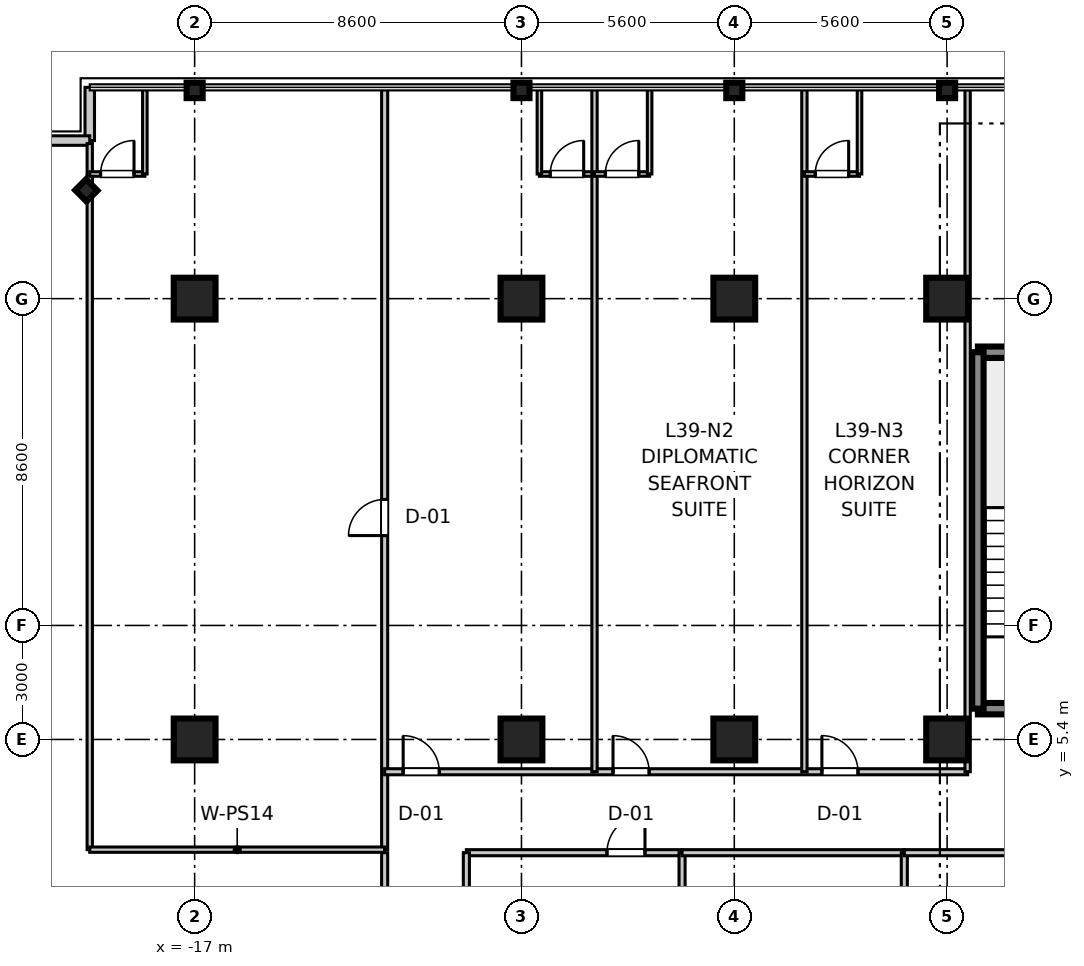
"""IFC4 building model, lengths in metres.
Left out: names, types, materials, properties, quantities, classifications, styles, units other than length and angle.
Written with IfcOpenShell. Run it as: python <this file> out.ifc"""

import sys

from ifc_helpers import new_model, si_unit, direction, frame, frame_2d, origin, origin_2d, place, context, subcontext, project, spatial, rectangle, i_section, extrude, source, transform, mapped, element, fill, save


model = new_model("IFC4")
c1 = context("Model", 3, precision=1e-05, world=origin(), true_north=direction((0.0, 1.0)))
c2 = subcontext(c1, "Body", "Model", "MODEL_VIEW")
j1 = project(units=[si_unit("LENGTHUNIT", "METRE"), si_unit("PLANEANGLEUNIT", "RADIAN")], contexts=[c1])
p1 = place(None, origin())
s1 = spatial("IfcSite", under=j1, at=p1, CompositionType="ELEMENT")
p2 = place(p1, origin())
s2 = spatial("IfcBuilding", under=s1, at=p2, CompositionType="ELEMENT")
p3 = place(p2, frame((0.0, 0.0, 156.3)))
s3 = spatial("IfcBuildingStorey", under=s2, at=p3, CompositionType="ELEMENT", Elevation=156.3)
m1 = source(origin(), c2, "Body", "SweptSolid", [
    extrude(rectangle(XDim=1.1, YDim=1.1, at=origin_2d()), origin(), (0.0, 0.0, 1.0), 3.605),
])
for number, where, z_axis, x_axis in (
    (1, (-17.0, 5.4, 0.0), (0.0, 0.0, 1.0), (1.0, 0.0, 0.0)),
    (2, (-17.0, 17.0, 0.0), (0.0, 0.0, 1.0), (1.0, 0.0, 0.0)),
    (3, (-8.4, 5.4, 0.0), (0.0, 0.0, 1.0), (1.0, 0.0, 0.0)),
    (4, (-8.4, 17.0, 0.0), (0.0, 0.0, 1.0), (1.0, 0.0, 0.0)),
    (5, (-2.8, 5.4, 0.0), (0.0, 0.0, 1.0), (1.0, 0.0, 0.0)),
    (6, (-2.8, 17.0, 0.0), (0.0, 0.0, 1.0), (1.0, 0.0, 0.0)),
    (7, (2.8, 5.4, 0.0), (0.0, 0.0, 1.0), (1.0, 0.0, 0.0)),
    (8, (2.8, 17.0, 0.0), (0.0, 0.0, 1.0), (1.0, 0.0, 0.0)),
):
    element("IfcColumn", number, at=place(p3, frame(where, z_axis=z_axis, x_axis=x_axis)), inside=s3, PredefinedType="COLUMN", context=c2, shape_type="MappedRepresentation", body=[
        mapped(m1, transform((0.0, 0.0, 0.0), scale=1.0)),
    ])
m2 = source(origin(), c2, "Body", "SweptSolid", [
    extrude(i_section(OverallWidth=0.406, OverallDepth=0.422, WebThickness=0.019, FlangeThickness=0.03, at=origin_2d()), origin(), (0.0, 0.0, 1.0), 3.605),
])
for number, where, z_axis, x_axis in (
    (9, (-17.0, 22.48, 0.0), (0.0, 0.0, 1.0), (0.0, 1.0, 0.0)),
    (10, (-8.4, 22.48, 0.0), (0.0, 0.0, 1.0), (0.0, 1.0, 0.0)),
    (11, (-2.8, 22.48, 0.0), (0.0, 0.0, 1.0), (0.0, 1.0, 0.0)),
    (12, (2.8, 22.48, 0.0), (0.0, 0.0, 1.0), (0.0, 1.0, 0.0)),
    (13, (-19.85, 19.85, 0.0), (0.0, 0.0, 1.0), (0.707, 0.707, 0.0)),
):
    element("IfcColumn", number, at=place(p3, frame(where, z_axis=z_axis, x_axis=x_axis)), inside=s3, PredefinedType="COLUMN", context=c2, shape_type="MappedRepresentation", body=[
        mapped(m2, transform((0.0, 0.0, 0.0), scale=1.0)),
    ])
m3 = source(origin(), c2, "Body", "SweptSolid", [
    extrude(rectangle(XDim=3.98, YDim=0.3, at=frame_2d((1.99, 0.0))), origin(), (0.0, 0.0, 1.0), 3.39),
])
for number, where, z_axis, x_axis in (
    (14, (3.61, 6.21, 0.0), (0.0, 0.0, 1.0), (1.0, 0.0, 0.0)),
    (15, (3.61, 15.59, 0.0), (0.0, 0.0, 1.0), (1.0, 0.0, 0.0)),
):
    element("IfcWall", number, at=place(p3, frame(where, z_axis=z_axis, x_axis=x_axis)), inside=s3, PredefinedType="SHEAR", context=c2, shape_type="MappedRepresentation", body=[
        mapped(m3, transform((0.0, 0.0, 0.0), scale=1.0)),
    ])
m4 = source(origin(), c2, "Body", "SweptSolid", [
    extrude(rectangle(XDim=9.38, YDim=0.3, at=frame_2d((4.69, 0.0))), origin(), (0.0, 0.0, 1.0), 3.39),
])
p4 = place(p3, frame((3.61, 6.21, 0.0), z_axis=(0.0, 0.0, 1.0), x_axis=(0.0, 1.0, 0.0)))
e16 = element("IfcWall", 16, at=p4, inside=s3, PredefinedType="SHEAR", context=c2, shape_type="MappedRepresentation", body=[
    mapped(m4, transform((0.0, 0.0, 0.0), scale=1.0)),
])
m5 = source(origin(), c2, "Body", "SweptSolid", [
    extrude(rectangle(XDim=1.4, YDim=0.25, at=frame_2d((0.7, 0.0))), origin(), (0.0, 0.0, 1.0), 3.39),
])
p5 = place(p3, frame((-19.76, 21.16, 0.0), z_axis=(0.0, 0.0, 1.0), x_axis=(0.0, 1.0, 0.0)))
e17 = element("IfcWall", 17, at=p5, inside=s3, PredefinedType="STANDARD", context=c2, shape_type="MappedRepresentation", body=[
    mapped(m5, transform((0.0, 0.0, 0.0), scale=1.0)),
])
m6 = source(origin(), c2, "Body", "SweptSolid", [
    extrude(rectangle(XDim=1.4, YDim=0.25, at=frame_2d((0.7, 0.0))), origin(), (0.0, 0.0, 1.0), 3.39),
])
p6 = place(p3, frame((-21.16, 21.16, 0.0), z_axis=(0.0, 0.0, 1.0), x_axis=(1.0, 0.0, 0.0)))
e18 = element("IfcWall", 18, at=p6, inside=s3, PredefinedType="STANDARD", context=c2, shape_type="MappedRepresentation", body=[
    mapped(m6, transform((0.0, 0.0, 0.0), scale=1.0)),
])
m7 = source(origin(), c2, "Body", "SweptSolid", [
    extrude(rectangle(XDim=20.0, YDim=0.16, at=frame_2d((10.0, 0.0))), origin(), (0.0, 0.0, 1.0), 2.73),
])
p7 = place(p3, frame((-12.0, 2.5, 0.0), z_axis=(0.0, 0.0, 1.0), x_axis=(0.0, 1.0, 0.0)))
e19 = element("IfcWall", 19, at=p7, inside=s3, PredefinedType="PARTITIONING", context=c2, shape_type="MappedRepresentation", body=[
    mapped(m7, transform((0.0, 0.0, 0.0), scale=1.0)),
])
p8 = place(p7, frame((8.265, 0.0, 0.0)))
e20 = element("IfcOpeningElement", 20, at=p8, cuts=e19, PredefinedType="OPENING", context=c2, shape_type="SweptSolid", body=[
    extrude(rectangle(XDim=0.95, YDim=2.1, at=frame_2d((0.475, 1.05))), frame((0.0, 0.09, 0.0), z_axis=(0.0, -1.0, 0.0), x_axis=(1.0, 0.0, 0.0)), (0.0, 0.0, 1.0), 0.18),
])
m8 = source(origin(), c2, "Body", "SweptSolid", [
    extrude(rectangle(XDim=18.58, YDim=0.14, at=frame_2d((9.29, 0.0))), origin(), (0.0, 0.0, 1.0), 2.73),
])
p9 = place(p3, frame((-19.76, 2.5, 0.0), z_axis=(0.0, 0.0, 1.0), x_axis=(0.0, 1.0, 0.0)))
e21 = element("IfcWall", 21, at=p9, inside=s3, PredefinedType="PARTITIONING", context=c2, shape_type="MappedRepresentation", body=[
    mapped(m8, transform((0.0, 0.0, 0.0), scale=1.0)),
])
m9 = source(origin(), c2, "Body", "SweptSolid", [
    extrude(rectangle(XDim=7.76, YDim=0.14, at=frame_2d((3.88, 0.0))), origin(), (0.0, 0.0, 1.0), 2.73),
])
p10 = place(p3, frame((-19.76, 2.5, 0.0), z_axis=(0.0, 0.0, 1.0), x_axis=(1.0, 0.0, 0.0)))
e22 = element("IfcWall", 22, at=p10, inside=s3, PredefinedType="PARTITIONING", context=c2, shape_type="MappedRepresentation", body=[
    mapped(m9, transform((0.0, 0.0, 0.0), scale=1.0)),
])
m10 = source(origin(), c2, "Body", "SweptSolid", [
    extrude(rectangle(XDim=1.45, YDim=0.12, at=frame_2d((0.725, 0.0))), origin(), (0.0, 0.0, 1.0), 2.73),
])
p11 = place(p3, frame((-19.76, 20.28, 0.0), z_axis=(0.0, 0.0, 1.0), x_axis=(1.0, 0.0, 0.0)))
e23 = element("IfcWall", 23, at=p11, inside=s3, PredefinedType="PARTITIONING", context=c2, shape_type="MappedRepresentation", body=[
    mapped(m10, transform((0.0, 0.0, 0.0), scale=1.0)),
])
p12 = place(p11, frame((0.285, 0.0, 0.0)))
e24 = element("IfcOpeningElement", 24, at=p12, cuts=e23, PredefinedType="OPENING", context=c2, shape_type="SweptSolid", body=[
    extrude(rectangle(XDim=0.88, YDim=2.1, at=frame_2d((0.44, 1.05))), frame((0.0, 0.07, 0.0), z_axis=(0.0, -1.0, 0.0), x_axis=(1.0, 0.0, 0.0)), (0.0, 0.0, 1.0), 0.14),
])
m11 = source(origin(), c2, "Body", "SweptSolid", [
    extrude(rectangle(XDim=2.22, YDim=0.12, at=frame_2d((1.11, 0.0))), origin(), (0.0, 0.0, 1.0), 2.73),
])
p13 = place(p3, frame((-18.31, 20.28, 0.0), z_axis=(0.0, 0.0, 1.0), x_axis=(0.0, 1.0, 0.0)))
e25 = element("IfcWall", 25, at=p13, inside=s3, PredefinedType="PARTITIONING", context=c2, shape_type="MappedRepresentation", body=[
    mapped(m11, transform((0.0, 0.0, 0.0), scale=1.0)),
])
m12 = source(origin(), c2, "Body", "SweptSolid", [
    extrude(rectangle(XDim=15.34, YDim=0.16, at=frame_2d((7.67, 0.0))), origin(), (0.0, 0.0, 1.0), 2.73),
])
p14 = place(p3, frame((-12.0, 4.55, 0.0), z_axis=(0.0, 0.0, 1.0), x_axis=(1.0, 0.0, 0.0)))
e26 = element("IfcWall", 26, at=p14, inside=s3, PredefinedType="PARTITIONING", context=c2, shape_type="MappedRepresentation", body=[
    mapped(m12, transform((0.0, 0.0, 0.0), scale=1.0)),
])
p15 = place(p14, frame((0.487, 0.0, 0.0)))
e27 = element("IfcOpeningElement", 27, at=p15, cuts=e26, PredefinedType="OPENING", context=c2, shape_type="SweptSolid", body=[
    extrude(rectangle(XDim=0.95, YDim=2.1, at=frame_2d((0.475, 1.05))), frame((0.0, 0.09, 0.0), z_axis=(0.0, -1.0, 0.0), x_axis=(1.0, 0.0, 0.0)), (0.0, 0.0, 1.0), 0.18),
])
p16 = place(p14, frame((6.009, 0.0, 0.0)))
e28 = element("IfcOpeningElement", 28, at=p16, cuts=e26, PredefinedType="OPENING", context=c2, shape_type="SweptSolid", body=[
    extrude(rectangle(XDim=0.95, YDim=2.1, at=frame_2d((0.475, 1.05))), frame((0.0, 0.09, 0.0), z_axis=(0.0, -1.0, 0.0), x_axis=(1.0, 0.0, 0.0)), (0.0, 0.0, 1.0), 0.18),
])
p17 = place(p14, frame((11.505, 0.0, 0.0)))
e29 = element("IfcOpeningElement", 29, at=p17, cuts=e26, PredefinedType="OPENING", context=c2, shape_type="SweptSolid", body=[
    extrude(rectangle(XDim=0.95, YDim=2.1, at=frame_2d((0.475, 1.05))), frame((0.0, 0.09, 0.0), z_axis=(0.0, -1.0, 0.0), x_axis=(1.0, 0.0, 0.0)), (0.0, 0.0, 1.0), 0.18),
])
m13 = source(origin(), c2, "Body", "SweptSolid", [
    extrude(rectangle(XDim=17.95, YDim=0.14, at=frame_2d((8.975, 0.0))), origin(), (0.0, 0.0, 1.0), 2.73),
])
p18 = place(p3, frame((3.34, 4.55, 0.0), z_axis=(0.0, 0.0, 1.0), x_axis=(0.0, 1.0, 0.0)))
e30 = element("IfcWall", 30, at=p18, inside=s3, PredefinedType="PARTITIONING", context=c2, shape_type="MappedRepresentation", body=[
    mapped(m13, transform((0.0, 0.0, 0.0), scale=1.0)),
])
p19 = place(p3, frame((-7.928, 20.28, 0.0), z_axis=(0.0, 0.0, 1.0), x_axis=(1.0, 0.0, 0.0)))
e31 = element("IfcWall", 31, at=p19, inside=s3, PredefinedType="PARTITIONING", context=c2, shape_type="MappedRepresentation", body=[
    mapped(m10, transform((0.0, 0.0, 0.0), scale=1.0)),
])
p20 = place(p19, frame((0.285, 0.0, 0.0)))
e32 = element("IfcOpeningElement", 32, at=p20, cuts=e31, PredefinedType="OPENING", context=c2, shape_type="SweptSolid", body=[
    extrude(rectangle(XDim=0.88, YDim=2.1, at=frame_2d((0.44, 1.05))), frame((0.0, 0.07, 0.0), z_axis=(0.0, -1.0, 0.0), x_axis=(1.0, 0.0, 0.0)), (0.0, 0.0, 1.0), 0.14),
])
p21 = place(p3, frame((-7.928, 20.28, 0.0), z_axis=(0.0, 0.0, 1.0), x_axis=(0.0, 1.0, 0.0)))
e33 = element("IfcWall", 33, at=p21, inside=s3, PredefinedType="PARTITIONING", context=c2, shape_type="MappedRepresentation", body=[
    mapped(m11, transform((0.0, 0.0, 0.0), scale=1.0)),
])
p22 = place(p3, frame((-6.478, 4.55, 0.0), z_axis=(0.0, 0.0, 1.0), x_axis=(0.0, 1.0, 0.0)))
e34 = element("IfcWall", 34, at=p22, inside=s3, PredefinedType="PARTITIONING", context=c2, shape_type="MappedRepresentation", body=[
    mapped(m13, transform((0.0, 0.0, 0.0), scale=1.0)),
])
p23 = place(p3, frame((-6.478, 20.28, 0.0), z_axis=(0.0, 0.0, 1.0), x_axis=(1.0, 0.0, 0.0)))
e35 = element("IfcWall", 35, at=p23, inside=s3, PredefinedType="PARTITIONING", context=c2, shape_type="MappedRepresentation", body=[
    mapped(m10, transform((0.0, 0.0, 0.0), scale=1.0)),
])
p24 = place(p23, frame((0.285, 0.0, 0.0)))
e36 = element("IfcOpeningElement", 36, at=p24, cuts=e35, PredefinedType="OPENING", context=c2, shape_type="SweptSolid", body=[
    extrude(rectangle(XDim=0.88, YDim=2.1, at=frame_2d((0.44, 1.05))), frame((0.0, 0.07, 0.0), z_axis=(0.0, -1.0, 0.0), x_axis=(1.0, 0.0, 0.0)), (0.0, 0.0, 1.0), 0.14),
])
p25 = place(p3, frame((-5.028, 20.28, 0.0), z_axis=(0.0, 0.0, 1.0), x_axis=(0.0, 1.0, 0.0)))
e37 = element("IfcWall", 37, at=p25, inside=s3, PredefinedType="PARTITIONING", context=c2, shape_type="MappedRepresentation", body=[
    mapped(m11, transform((0.0, 0.0, 0.0), scale=1.0)),
])
p26 = place(p3, frame((-0.955, 4.55, 0.0), z_axis=(0.0, 0.0, 1.0), x_axis=(0.0, 1.0, 0.0)))
e38 = element("IfcWall", 38, at=p26, inside=s3, PredefinedType="PARTITIONING", context=c2, shape_type="MappedRepresentation", body=[
    mapped(m13, transform((0.0, 0.0, 0.0), scale=1.0)),
])
m14 = source(origin(), c2, "Body", "SweptSolid", [
    extrude(rectangle(XDim=1.45, YDim=0.12, at=frame_2d((0.725, 0.0))), origin(), (0.0, 0.0, 1.0), 2.73),
])
p27 = place(p3, frame((-0.955, 20.28, 0.0), z_axis=(0.0, 0.0, 1.0), x_axis=(1.0, 0.0, 0.0)))
e39 = element("IfcWall", 39, at=p27, inside=s3, PredefinedType="PARTITIONING", context=c2, shape_type="MappedRepresentation", body=[
    mapped(m14, transform((0.0, 0.0, 0.0), scale=1.0)),
])
p28 = place(p27, frame((0.285, 0.0, 0.0)))
e40 = element("IfcOpeningElement", 40, at=p28, cuts=e39, PredefinedType="OPENING", context=c2, shape_type="SweptSolid", body=[
    extrude(rectangle(XDim=0.88, YDim=2.1, at=frame_2d((0.44, 1.05))), frame((0.0, 0.07, 0.0), z_axis=(0.0, -1.0, 0.0), x_axis=(1.0, 0.0, 0.0)), (0.0, 0.0, 1.0), 0.14),
])
p29 = place(p3, frame((0.495, 20.28, 0.0), z_axis=(0.0, 0.0, 1.0), x_axis=(0.0, 1.0, 0.0)))
e41 = element("IfcWall", 41, at=p29, inside=s3, PredefinedType="PARTITIONING", context=c2, shape_type="MappedRepresentation", body=[
    mapped(m11, transform((0.0, 0.0, 0.0), scale=1.0)),
])
m15 = source(origin(), c2, "Body", "SweptSolid", [
    extrude(rectangle(XDim=4.84, YDim=0.16, at=frame_2d((2.42, 0.0))), origin(), (0.0, 0.0, 1.0), 2.73),
])
p30 = place(p3, frame((-12.0, -2.42, 0.0), z_axis=(0.0, 0.0, 1.0), x_axis=(0.0, 1.0, 0.0)))
e42 = element("IfcWall", 42, at=p30, inside=s3, PredefinedType="PARTITIONING", context=c2, shape_type="MappedRepresentation", body=[
    mapped(m15, transform((0.0, 0.0, 0.0), scale=1.0)),
])
p31 = place(p30, frame((1.945, 0.0, 0.0)))
e43 = element("IfcOpeningElement", 43, at=p31, cuts=e42, PredefinedType="OPENING", context=c2, shape_type="SweptSolid", body=[
    extrude(rectangle(XDim=0.95, YDim=2.1, at=frame_2d((0.475, 1.05))), frame((0.0, 0.09, 0.0), z_axis=(0.0, -1.0, 0.0), x_axis=(1.0, 0.0, 0.0)), (0.0, 0.0, 1.0), 0.18),
])
m16 = source(origin(), c2, "Body", "SweptSolid", [
    extrude(rectangle(XDim=5.676, YDim=0.16, at=frame_2d((2.838, 0.0))), origin(), (0.0, 0.0, 1.0), 2.73),
])
p32 = place(p3, frame((-9.85, 2.42, 0.0), z_axis=(0.0, 0.0, 1.0), x_axis=(1.0, 0.0, 0.0)))
e44 = element("IfcWall", 44, at=p32, inside=s3, PredefinedType="PARTITIONING", context=c2, shape_type="MappedRepresentation", body=[
    mapped(m16, transform((0.0, 0.0, 0.0), scale=1.0)),
])
p33 = place(p32, frame((3.7, 0.0, 0.0)))
e45 = element("IfcOpeningElement", 45, at=p33, cuts=e44, PredefinedType="OPENING", context=c2, shape_type="SweptSolid", body=[
    extrude(rectangle(XDim=1.0, YDim=2.1, at=frame_2d((0.5, 1.05))), frame((0.0, 0.09, 0.0), z_axis=(0.0, -1.0, 0.0), x_axis=(1.0, 0.0, 0.0)), (0.0, 0.0, 1.0), 0.18),
])
for number, where, z_axis, x_axis in (
    (46, (-9.85, -2.42, 0.0), (0.0, 0.0, 1.0), (0.0, 1.0, 0.0)),
    (47, (-4.174, -2.42, 0.0), (0.0, 0.0, 1.0), (0.0, 1.0, 0.0)),
):
    element("IfcWall", number, at=place(p3, frame(where, z_axis=z_axis, x_axis=x_axis)), inside=s3, PredefinedType="PARTITIONING", context=c2, shape_type="MappedRepresentation", body=[
        mapped(m15, transform((0.0, 0.0, 0.0), scale=1.0)),
    ])
m17 = source(origin(), c2, "Body", "SweptSolid", [
    extrude(rectangle(XDim=5.848, YDim=0.16, at=frame_2d((2.924, 0.0))), origin(), (0.0, 0.0, 1.0), 2.73),
])
p34 = place(p3, frame((-4.174, 2.42, 0.0), z_axis=(0.0, 0.0, 1.0), x_axis=(1.0, 0.0, 0.0)))
e48 = element("IfcWall", 48, at=p34, inside=s3, PredefinedType="PARTITIONING", context=c2, shape_type="MappedRepresentation", body=[
    mapped(m17, transform((0.0, 0.0, 0.0), scale=1.0)),
])
p35 = place(p3, frame((1.674, -2.42, 0.0), z_axis=(0.0, 0.0, 1.0), x_axis=(0.0, 1.0, 0.0)))
e49 = element("IfcWall", 49, at=p35, inside=s3, PredefinedType="PARTITIONING", context=c2, shape_type="MappedRepresentation", body=[
    mapped(m15, transform((0.0, 0.0, 0.0), scale=1.0)),
])
p36 = place(p3, frame((1.674, 2.42, 0.0), z_axis=(0.0, 0.0, 1.0), x_axis=(1.0, 0.0, 0.0)))
e50 = element("IfcWall", 50, at=p36, inside=s3, PredefinedType="PARTITIONING", context=c2, shape_type="MappedRepresentation", body=[
    mapped(m16, transform((0.0, 0.0, 0.0), scale=1.0)),
])
p37 = place(p36, frame((3.36, 0.0, 0.0)))
e51 = element("IfcOpeningElement", 51, at=p37, cuts=e50, PredefinedType="OPENING", context=c2, shape_type="SweptSolid", body=[
    extrude(rectangle(XDim=1.0, YDim=2.1, at=frame_2d((0.5, 1.05))), frame((0.0, 0.09, 0.0), z_axis=(0.0, -1.0, 0.0), x_axis=(1.0, 0.0, 0.0)), (0.0, 0.0, 1.0), 0.18),
])
m18 = source(origin(), c2, "Body", "SweptSolid", [
    extrude(rectangle(XDim=0.88, YDim=2.1, at=frame_2d((0.44, 1.05))), frame((0.0, 0.025, 0.0), z_axis=(0.0, -1.0, 0.0), x_axis=(1.0, 0.0, 0.0)), (0.0, 0.0, 1.0), 0.05),
])
p38 = place(p12, origin())
e52 = element("IfcDoor", 52, at=p38, inside=s3, OperationType="SINGLE_SWING_RIGHT", PredefinedType="DOOR", context=c2, shape_type="MappedRepresentation", body=[
    mapped(m18, transform((0.0, 0.0, 0.0), scale=1.0)),
])
fill(e24, e52)
m19 = source(origin(), c2, "Body", "SweptSolid", [
    extrude(rectangle(XDim=0.95, YDim=2.1, at=frame_2d((0.475, 1.05))), frame((0.0, 0.025, 0.0), z_axis=(0.0, -1.0, 0.0), x_axis=(1.0, 0.0, 0.0)), (0.0, 0.0, 1.0), 0.05),
])
p39 = place(p8, origin())
e53 = element("IfcDoor", 53, at=p39, inside=s3, OperationType="SINGLE_SWING_LEFT", PredefinedType="DOOR", context=c2, shape_type="MappedRepresentation", body=[
    mapped(m19, transform((0.0, 0.0, 0.0), scale=1.0)),
])
fill(e20, e53)
p40 = place(p20, origin())
e54 = element("IfcDoor", 54, at=p40, inside=s3, OperationType="SINGLE_SWING_RIGHT", PredefinedType="DOOR", context=c2, shape_type="MappedRepresentation", body=[
    mapped(m18, transform((0.0, 0.0, 0.0), scale=1.0)),
])
fill(e32, e54)
p41 = place(p15, origin())
e55 = element("IfcDoor", 55, at=p41, inside=s3, OperationType="SINGLE_SWING_LEFT", PredefinedType="DOOR", context=c2, shape_type="MappedRepresentation", body=[
    mapped(m19, transform((0.0, 0.0, 0.0), scale=1.0)),
])
fill(e27, e55)
p42 = place(p24, origin())
e56 = element("IfcDoor", 56, at=p42, inside=s3, OperationType="SINGLE_SWING_RIGHT", PredefinedType="DOOR", context=c2, shape_type="MappedRepresentation", body=[
    mapped(m18, transform((0.0, 0.0, 0.0), scale=1.0)),
])
fill(e36, e56)
p43 = place(p16, origin())
e57 = element("IfcDoor", 57, at=p43, inside=s3, OperationType="SINGLE_SWING_LEFT", PredefinedType="DOOR", context=c2, shape_type="MappedRepresentation", body=[
    mapped(m19, transform((0.0, 0.0, 0.0), scale=1.0)),
])
fill(e28, e57)
p44 = place(p28, origin())
e58 = element("IfcDoor", 58, at=p44, inside=s3, OperationType="SINGLE_SWING_RIGHT", PredefinedType="DOOR", context=c2, shape_type="MappedRepresentation", body=[
    mapped(m18, transform((0.0, 0.0, 0.0), scale=1.0)),
])
fill(e40, e58)
p45 = place(p17, origin())
e59 = element("IfcDoor", 59, at=p45, inside=s3, OperationType="SINGLE_SWING_LEFT", PredefinedType="DOOR", context=c2, shape_type="MappedRepresentation", body=[
    mapped(m19, transform((0.0, 0.0, 0.0), scale=1.0)),
])
fill(e29, e59)
m20 = source(origin(), c2, "Body", "SweptSolid", [
    extrude(rectangle(XDim=1.0, YDim=2.1, at=frame_2d((0.5, 1.05))), frame((0.0, 0.025, 0.0), z_axis=(0.0, -1.0, 0.0), x_axis=(1.0, 0.0, 0.0)), (0.0, 0.0, 1.0), 0.05),
])
p46 = place(p33, frame((1.0, 0.0, 0.0), z_axis=(0.0, 0.0, 1.0), x_axis=(-1.0, 0.0, 0.0)))
e60 = element("IfcDoor", 60, at=p46, inside=s3, OperationType="SINGLE_SWING_RIGHT", PredefinedType="DOOR", context=c2, shape_type="MappedRepresentation", body=[
    mapped(m20, transform((0.0, 0.0, 0.0), scale=1.0)),
])
fill(e45, e60)
save(model, sys.argv[1])
